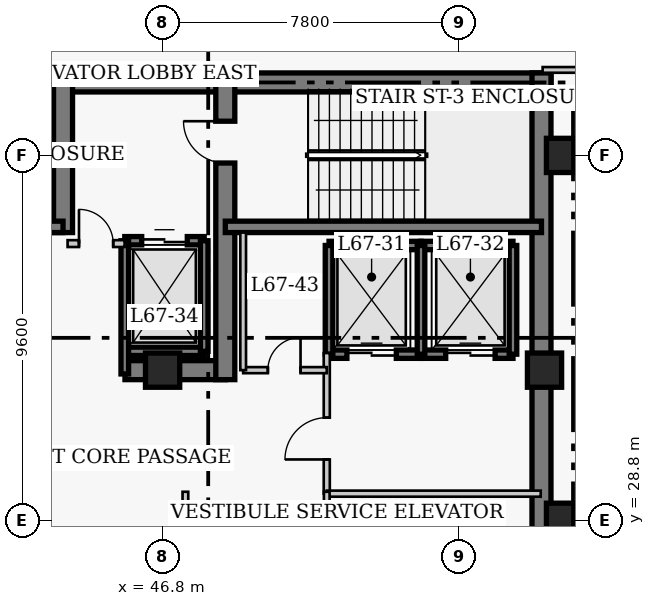
"""IFC4 building model, lengths in metres.
Left out: names, types, materials, properties, quantities, classifications, styles, units other than length and angle.
Written with IfcOpenShell. Run it as: python <this file> out.ifc"""

import sys

from ifc_helpers import new_model, si_unit, direction, frame, frame_2d, origin, origin_2d, place, context, subcontext, project, spatial, rectangle, extrude, element, fill, save


model = new_model("IFC4")
c1 = context("Model", 3, precision=1e-05, world=origin(), true_north=direction((0.0, 1.0)))
c2 = subcontext(c1, "Body", "Model", "MODEL_VIEW")
j1 = project(units=[si_unit("LENGTHUNIT", "METRE"), si_unit("PLANEANGLEUNIT", "RADIAN")], contexts=[c1])
p1 = place(None, origin())
s1 = spatial("IfcSite", under=j1, at=p1, CompositionType="ELEMENT")
p2 = place(p1, origin())
s2 = spatial("IfcBuilding", under=s1, at=p2, CompositionType="ELEMENT")
p3 = place(p2, frame((0.0, 0.0, 269.4)))
s3 = spatial("IfcBuildingStorey", under=s2, at=p3, CompositionType="ELEMENT", Elevation=269.4)
p4 = place(p3, frame((35.85, 40.32, 0.0), z_axis=(0.0, 0.0, 1.0), x_axis=(1.0, 0.0, 0.0)))
e1 = element("IfcWall", 1, at=p4, inside=s3, PredefinedType="SHEAR", context=c2, shape_type="SweptSolid", body=[
    extrude(rectangle(XDim=12.6, YDim=0.5, at=frame_2d((6.3, 0.0))), origin(), (0.0, 0.0, 1.0), 4.0),
])
p5 = place(p3, frame((48.45, 40.32, 0.0), z_axis=(0.0, 0.0, 1.0), x_axis=(1.0, 0.0, 0.0)))
e2 = element("IfcWall", 2, at=p5, inside=s3, PredefinedType="SHEAR", context=c2, shape_type="SweptSolid", body=[
    extrude(rectangle(XDim=8.57, YDim=0.5, at=frame_2d((4.285, 0.0))), origin(), (0.0, 0.0, 1.0), 4.0),
])
p6 = place(p3, frame((56.77, 27.05, 0.0), z_axis=(0.0, 0.0, 1.0), x_axis=(0.0, 1.0, 0.0)))
e3 = element("IfcWall", 3, at=p6, inside=s3, PredefinedType="SHEAR", context=c2, shape_type="SweptSolid", body=[
    extrude(rectangle(XDim=13.52, YDim=0.5, at=frame_2d((6.76, 0.0))), origin(), (0.0, 0.0, 1.0), 4.0),
])
p7 = place(p3, frame((45.81, 32.75, 0.0), z_axis=(0.0, 0.0, 1.0), x_axis=(1.0, 0.0, 0.0)))
e4 = element("IfcWall", 4, at=p7, inside=s3, PredefinedType="SHEAR", context=c2, shape_type="SweptSolid", body=[
    extrude(rectangle(XDim=2.64, YDim=0.5, at=frame_2d((1.32, 0.0))), origin(), (0.0, 0.0, 1.0), 4.0),
])
p8 = place(p3, frame((44.18, 36.37, 0.0), z_axis=(0.0, 0.0, 1.0), x_axis=(0.0, 1.0, 0.0)))
e5 = element("IfcWall", 5, at=p8, inside=s3, PredefinedType="SHEAR", context=c2, shape_type="SweptSolid", body=[
    extrude(rectangle(XDim=3.95, YDim=0.5, at=frame_2d((1.975, 0.0))), origin(), (0.0, 0.0, 1.0), 4.0),
])
p9 = place(p3, frame((48.45, 32.5, 0.0), z_axis=(0.0, 0.0, 1.0), x_axis=(0.0, 1.0, 0.0)))
e6 = element("IfcWall", 6, at=p9, inside=s3, PredefinedType="SHEAR", context=c2, shape_type="SweptSolid", body=[
    extrude(rectangle(XDim=7.82, YDim=0.5, at=frame_2d((3.91, 0.0))), origin(), (0.0, 0.0, 1.0), 4.0),
])
p10 = place(p9, frame((5.7, 0.0, 0.0)))
e7 = element("IfcOpeningElement", 7, at=p10, cuts=e6, PredefinedType="OPENING", context=c2, shape_type="SweptSolid", body=[
    extrude(rectangle(XDim=1.1, YDim=2.15, at=frame_2d((0.55, 1.075))), frame((0.0, 0.26, 0.0), z_axis=(0.0, -1.0, 0.0), x_axis=(1.0, 0.0, 0.0)), (0.0, 0.0, 1.0), 0.52),
])
p11 = place(p3, frame((35.85, 36.52, 0.0), z_axis=(0.0, 0.0, 1.0), x_axis=(1.0, 0.0, 0.0)))
e8 = element("IfcWall", 8, at=p11, inside=s3, PredefinedType="SHEAR", context=c2, shape_type="SweptSolid", body=[
    extrude(rectangle(XDim=8.33, YDim=0.3, at=frame_2d((4.165, 0.0))), origin(), (0.0, 0.0, 1.0), 4.0),
])
p12 = place(p3, frame((48.45, 36.52, 0.0), z_axis=(0.0, 0.0, 1.0), x_axis=(1.0, 0.0, 0.0)))
e9 = element("IfcWall", 9, at=p12, inside=s3, PredefinedType="SHEAR", context=c2, shape_type="SweptSolid", body=[
    extrude(rectangle(XDim=8.32, YDim=0.3, at=frame_2d((4.16, 0.0))), origin(), (0.0, 0.0, 1.0), 4.0),
])
for number, where, z_axis, x_axis in (
    (10, (57.35, 28.8, 0.0), (0.0, 0.0, 1.0), (1.0, 0.0, 0.0)),
    (11, (57.35, 38.4, 0.0), (0.0, 0.0, 1.0), (1.0, 0.0, 0.0)),
    (12, (46.8, 32.75, 0.0), (0.0, 0.0, 1.0), (1.0, 0.0, 0.0)),
    (13, (56.85, 32.75, 0.0), (0.0, 0.0, 1.0), (1.0, 0.0, 0.0)),
):
    element("IfcColumn", number, at=place(p3, frame(where, z_axis=z_axis, x_axis=x_axis)), inside=s3, PredefinedType="COLUMN", context=c2, shape_type="SweptSolid", body=[
        extrude(rectangle(XDim=0.9, YDim=0.9, at=origin_2d()), origin(), (0.0, 0.0, 1.0), 4.0),
    ])
p13 = place(p3, frame((51.18, 36.03, 0.0), z_axis=(0.0, 0.0, 1.0), x_axis=(1.0, 0.0, 0.0)))
e14 = element("IfcWall", 14, at=p13, inside=s3, PredefinedType="SHEAR", context=c2, shape_type="SweptSolid", body=[
    extrude(rectangle(XDim=2.42, YDim=0.22, at=frame_2d((1.21, 0.0))), origin(), (0.0, 0.0, 1.0), 4.0),
])
p14 = place(p3, frame((51.18, 33.17, 0.0), z_axis=(0.0, 0.0, 1.0), x_axis=(1.0, 0.0, 0.0)))
e15 = element("IfcWall", 15, at=p14, inside=s3, PredefinedType="SHEAR", context=c2, shape_type="SweptSolid", body=[
    extrude(rectangle(XDim=2.42, YDim=0.22, at=frame_2d((1.21, 0.0))), origin(), (0.0, 0.0, 1.0), 4.0),
])
p15 = place(p14, frame((0.47, 0.0, 0.0)))
e16 = element("IfcOpeningElement", 16, at=p15, cuts=e15, PredefinedType="OPENING", context=c2, shape_type="SweptSolid", body=[
    extrude(rectangle(XDim=1.3, YDim=2.15, at=frame_2d((0.65, 1.075))), frame((0.0, 0.12, 0.0), z_axis=(0.0, -1.0, 0.0), x_axis=(1.0, 0.0, 0.0)), (0.0, 0.0, 1.0), 0.24),
])
p16 = place(p3, frame((51.18, 33.17, 0.0), z_axis=(0.0, 0.0, 1.0), x_axis=(0.0, 1.0, 0.0)))
e17 = element("IfcWall", 17, at=p16, inside=s3, PredefinedType="SHEAR", context=c2, shape_type="SweptSolid", body=[
    extrude(rectangle(XDim=2.86, YDim=0.2, at=frame_2d((1.43, 0.0))), origin(), (0.0, 0.0, 1.0), 4.0),
])
p17 = place(p3, frame((53.6, 36.03, 0.0), z_axis=(0.0, 0.0, 1.0), x_axis=(1.0, 0.0, 0.0)))
e18 = element("IfcWall", 18, at=p17, inside=s3, PredefinedType="SHEAR", context=c2, shape_type="SweptSolid", body=[
    extrude(rectangle(XDim=2.42, YDim=0.22, at=frame_2d((1.21, 0.0))), origin(), (0.0, 0.0, 1.0), 4.0),
])
p18 = place(p3, frame((53.6, 33.17, 0.0), z_axis=(0.0, 0.0, 1.0), x_axis=(1.0, 0.0, 0.0)))
e19 = element("IfcWall", 19, at=p18, inside=s3, PredefinedType="SHEAR", context=c2, shape_type="SweptSolid", body=[
    extrude(rectangle(XDim=2.42, YDim=0.22, at=frame_2d((1.21, 0.0))), origin(), (0.0, 0.0, 1.0), 4.0),
])
p19 = place(p18, frame((0.65, 0.0, 0.0)))
e20 = element("IfcOpeningElement", 20, at=p19, cuts=e19, PredefinedType="OPENING", context=c2, shape_type="SweptSolid", body=[
    extrude(rectangle(XDim=1.3, YDim=2.15, at=frame_2d((0.65, 1.075))), frame((0.0, 0.12, 0.0), z_axis=(0.0, -1.0, 0.0), x_axis=(1.0, 0.0, 0.0)), (0.0, 0.0, 1.0), 0.24),
])
for number, where, z_axis, x_axis in (
    (21, (53.6, 33.17, 0.0), (0.0, 0.0, 1.0), (0.0, 1.0, 0.0)),
    (22, (56.02, 33.17, 0.0), (0.0, 0.0, 1.0), (0.0, 1.0, 0.0)),
):
    element("IfcWall", number, at=place(p3, frame(where, z_axis=z_axis, x_axis=x_axis)), inside=s3, PredefinedType="SHEAR", context=c2, shape_type="SweptSolid", body=[
        extrude(rectangle(XDim=2.86, YDim=0.2, at=frame_2d((1.43, 0.0))), origin(), (0.0, 0.0, 1.0), 4.0),
    ])
p20 = place(p3, frame((45.805, 36.155, 0.0), z_axis=(0.0, 0.0, 1.0), x_axis=(1.0, 0.0, 0.0)))
e23 = element("IfcWall", 23, at=p20, inside=s3, PredefinedType="SHEAR", context=c2, shape_type="SweptSolid", body=[
    extrude(rectangle(XDim=2.09, YDim=0.22, at=frame_2d((1.045, 0.0))), origin(), (0.0, 0.0, 1.0), 4.0),
])
p21 = place(p20, frame((0.445, 0.0, 0.0)))
e24 = element("IfcOpeningElement", 24, at=p21, cuts=e23, PredefinedType="OPENING", context=c2, shape_type="SweptSolid", body=[
    extrude(rectangle(XDim=1.2, YDim=2.15, at=frame_2d((0.6, 1.075))), frame((0.0, 0.12, 0.0), z_axis=(0.0, -1.0, 0.0), x_axis=(1.0, 0.0, 0.0)), (0.0, 0.0, 1.0), 0.24),
])
p22 = place(p3, frame((45.805, 33.245, 0.0), z_axis=(0.0, 0.0, 1.0), x_axis=(1.0, 0.0, 0.0)))
e25 = element("IfcWall", 25, at=p22, inside=s3, PredefinedType="SHEAR", context=c2, shape_type="SweptSolid", body=[
    extrude(rectangle(XDim=2.09, YDim=0.22, at=frame_2d((1.045, 0.0))), origin(), (0.0, 0.0, 1.0), 4.0),
])
p23 = place(p3, frame((45.805, 32.65, 0.0), z_axis=(0.0, 0.0, 1.0), x_axis=(0.0, 1.0, 0.0)))
e26 = element("IfcWall", 26, at=p23, inside=s3, PredefinedType="SHEAR", context=c2, shape_type="SweptSolid", body=[
    extrude(rectangle(XDim=3.505, YDim=0.2, at=frame_2d((1.752, 0.0))), origin(), (0.0, 0.0, 1.0), 4.0),
])
p24 = place(p3, frame((47.895, 33.245, 0.0), z_axis=(0.0, 0.0, 1.0), x_axis=(0.0, 1.0, 0.0)))
e27 = element("IfcWall", 27, at=p24, inside=s3, PredefinedType="SHEAR", context=c2, shape_type="SweptSolid", body=[
    extrude(rectangle(XDim=2.91, YDim=0.2, at=frame_2d((1.455, 0.0))), origin(), (0.0, 0.0, 1.0), 4.0),
])
p25 = place(p3, frame((44.3, 36.08, 0.0), z_axis=(0.0, 0.0, 1.0), x_axis=(1.0, 0.0, 0.0)))
e28 = element("IfcWall", 28, at=p25, inside=s3, PredefinedType="PARTITIONING", context=c2, shape_type="SweptSolid", body=[
    extrude(rectangle(XDim=1.5, YDim=0.18, at=frame_2d((0.75, 0.0))), origin(), (0.0, 0.0, 1.0), 3.76),
])
p26 = place(p25, frame((0.3, 0.0, 0.0)))
e29 = element("IfcOpeningElement", 29, at=p26, cuts=e28, PredefinedType="OPENING", context=c2, shape_type="SweptSolid", body=[
    extrude(rectangle(XDim=0.9, YDim=2.15, at=frame_2d((0.45, 1.075))), frame((0.0, 0.1, 0.0), z_axis=(0.0, -1.0, 0.0), x_axis=(1.0, 0.0, 0.0)), (0.0, 0.0, 1.0), 0.2),
])
p27 = place(p3, frame((51.12, 29.5, 0.0), z_axis=(0.0, 0.0, 1.0), x_axis=(0.0, 1.0, 0.0)))
e30 = element("IfcWall", 30, at=p27, inside=s3, PredefinedType="PARTITIONING", context=c2, shape_type="SweptSolid", body=[
    extrude(rectangle(XDim=3.7, YDim=0.16, at=frame_2d((1.85, 0.0))), origin(), (0.0, 0.0, 1.0), 3.76),
])
p28 = place(p27, frame((0.9, 0.0, 0.0)))
e31 = element("IfcOpeningElement", 31, at=p28, cuts=e30, PredefinedType="OPENING", context=c2, shape_type="SweptSolid", body=[
    extrude(rectangle(XDim=1.1, YDim=2.15, at=frame_2d((0.55, 1.075))), frame((0.0, 0.09, 0.0), z_axis=(0.0, -1.0, 0.0), x_axis=(1.0, 0.0, 0.0)), (0.0, 0.0, 1.0), 0.18),
])
p29 = place(p3, frame((51.12, 29.5, 0.0), z_axis=(0.0, 0.0, 1.0), x_axis=(1.0, 0.0, 0.0)))
e32 = element("IfcWall", 32, at=p29, inside=s3, PredefinedType="PARTITIONING", context=c2, shape_type="SweptSolid", body=[
    extrude(rectangle(XDim=5.63, YDim=0.16, at=frame_2d((2.815, 0.0))), origin(), (0.0, 0.0, 1.0), 3.76),
])
p30 = place(p3, frame((48.92, 32.75, 0.0), z_axis=(0.0, 0.0, 1.0), x_axis=(1.0, 0.0, 0.0)))
e33 = element("IfcWall", 33, at=p30, inside=s3, PredefinedType="PARTITIONING", context=c2, shape_type="SweptSolid", body=[
    extrude(rectangle(XDim=2.2, YDim=0.16, at=frame_2d((1.1, 0.0))), origin(), (0.0, 0.0, 1.0), 3.76),
])
p31 = place(p30, frame((0.65, 0.0, 0.0)))
e34 = element("IfcOpeningElement", 34, at=p31, cuts=e33, PredefinedType="OPENING", context=c2, shape_type="SweptSolid", body=[
    extrude(rectangle(XDim=0.86, YDim=2.05, at=frame_2d((0.43, 1.025))), frame((0.0, 0.09, 0.0), z_axis=(0.0, -1.0, 0.0), x_axis=(1.0, 0.0, 0.0)), (0.0, 0.0, 1.0), 0.18),
])
p32 = place(p3, frame((48.92, 32.75, 0.0), z_axis=(0.0, 0.0, 1.0), x_axis=(0.0, 1.0, 0.0)))
e35 = element("IfcWall", 35, at=p32, inside=s3, PredefinedType="PARTITIONING", context=c2, shape_type="SweptSolid", body=[
    extrude(rectangle(XDim=3.62, YDim=0.15, at=frame_2d((1.81, 0.0))), origin(), (0.0, 0.0, 1.0), 3.76),
])
p33 = place(p3, frame((56.8, 40.65, 0.0), z_axis=(0.0, 0.0, 1.0), x_axis=(1.0, 0.0, 0.0)))
e36 = element("IfcWall", 36, at=p33, inside=s3, PredefinedType="PARTITIONING", context=c2, shape_type="SweptSolid", body=[
    extrude(rectangle(XDim=4.21, YDim=0.15, at=frame_2d((2.105, 0.0))), origin(), (0.0, 0.0, 1.0), 3.76),
])
p34 = place(p33, frame((2.6, 0.0, 0.0)))
e37 = element("IfcOpeningElement", 37, at=p34, cuts=e36, PredefinedType="OPENING", context=c2, shape_type="SweptSolid", body=[
    extrude(rectangle(XDim=1.0, YDim=2.15, at=frame_2d((0.5, 1.075))), frame((0.0, 0.085, 0.0), z_axis=(0.0, -1.0, 0.0), x_axis=(1.0, 0.0, 0.0)), (0.0, 0.0, 1.0), 0.17),
])
for number, where, z_axis, x_axis in (
    (38, (47.4, 24.71, 0.0), (0.0, 0.0, 1.0), (0.0, 1.0, 0.0)),
    (39, (51.12, 24.71, 0.0), (0.0, 0.0, 1.0), (0.0, 1.0, 0.0)),
):
    element("IfcWall", number, at=place(p3, frame(where, z_axis=z_axis, x_axis=x_axis)), inside=s3, PredefinedType="PARTITIONING", context=c2, shape_type="SweptSolid", body=[
        extrude(rectangle(XDim=4.84, YDim=0.15, at=frame_2d((2.42, 0.0))), origin(), (0.0, 0.0, 1.0), 3.76),
    ])
p35 = place(p15, origin())
e40 = element("IfcDoor", 40, at=p35, inside=s3, OperationType="DOUBLE_DOOR_SLIDING", PredefinedType="DOOR", context=c2, shape_type="SweptSolid", body=[
    extrude(rectangle(XDim=1.3, YDim=2.15, at=frame_2d((0.65, 1.075))), frame((0.0, 0.025, 0.0), z_axis=(0.0, -1.0, 0.0), x_axis=(1.0, 0.0, 0.0)), (0.0, 0.0, 1.0), 0.05),
])
fill(e16, e40)
p36 = place(p19, origin())
e41 = element("IfcDoor", 41, at=p36, inside=s3, OperationType="DOUBLE_DOOR_SLIDING", PredefinedType="DOOR", context=c2, shape_type="SweptSolid", body=[
    extrude(rectangle(XDim=1.3, YDim=2.15, at=frame_2d((0.65, 1.075))), frame((0.0, 0.025, 0.0), z_axis=(0.0, -1.0, 0.0), x_axis=(1.0, 0.0, 0.0)), (0.0, 0.0, 1.0), 0.05),
])
fill(e20, e41)
p37 = place(p21, origin())
e42 = element("IfcDoor", 42, at=p37, inside=s3, OperationType="DOUBLE_DOOR_SLIDING", PredefinedType="DOOR", context=c2, shape_type="SweptSolid", body=[
    extrude(rectangle(XDim=1.2, YDim=2.15, at=frame_2d((0.6, 1.075))), frame((0.0, 0.025, 0.0), z_axis=(0.0, -1.0, 0.0), x_axis=(1.0, 0.0, 0.0)), (0.0, 0.0, 1.0), 0.05),
])
fill(e24, e42)
p38 = place(p26, origin())
e43 = element("IfcDoor", 43, at=p38, inside=s3, OperationType="SINGLE_SWING_LEFT", PredefinedType="DOOR", context=c2, shape_type="SweptSolid", body=[
    extrude(rectangle(XDim=0.9, YDim=2.15, at=frame_2d((0.45, 1.075))), frame((0.0, 0.025, 0.0), z_axis=(0.0, -1.0, 0.0), x_axis=(1.0, 0.0, 0.0)), (0.0, 0.0, 1.0), 0.05),
])
fill(e29, e43)
p39 = place(p28, origin())
e44 = element("IfcDoor", 44, at=p39, inside=s3, OperationType="SINGLE_SWING_LEFT", PredefinedType="DOOR", context=c2, shape_type="SweptSolid", body=[
    extrude(rectangle(XDim=1.1, YDim=2.15, at=frame_2d((0.55, 1.075))), frame((0.0, 0.025, 0.0), z_axis=(0.0, -1.0, 0.0), x_axis=(1.0, 0.0, 0.0)), (0.0, 0.0, 1.0), 0.05),
])
fill(e31, e44)
p40 = place(p31, origin())
e45 = element("IfcDoor", 45, at=p40, inside=s3, OperationType="SINGLE_SWING_RIGHT", PredefinedType="DOOR", context=c2, shape_type="SweptSolid", body=[
    extrude(rectangle(XDim=0.86, YDim=2.05, at=frame_2d((0.43, 1.025))), frame((0.0, 0.025, 0.0), z_axis=(0.0, -1.0, 0.0), x_axis=(1.0, 0.0, 0.0)), (0.0, 0.0, 1.0), 0.05),
])
fill(e34, e45)
p41 = place(p10, origin())
e46 = element("IfcDoor", 46, at=p41, inside=s3, OperationType="SINGLE_SWING_RIGHT", PredefinedType="DOOR", context=c2, shape_type="SweptSolid", body=[
    extrude(rectangle(XDim=1.1, YDim=2.15, at=frame_2d((0.55, 1.075))), frame((0.0, 0.025, 0.0), z_axis=(0.0, -1.0, 0.0), x_axis=(1.0, 0.0, 0.0)), (0.0, 0.0, 1.0), 0.05),
])
fill(e7, e46)
save(model, sys.argv[1])
